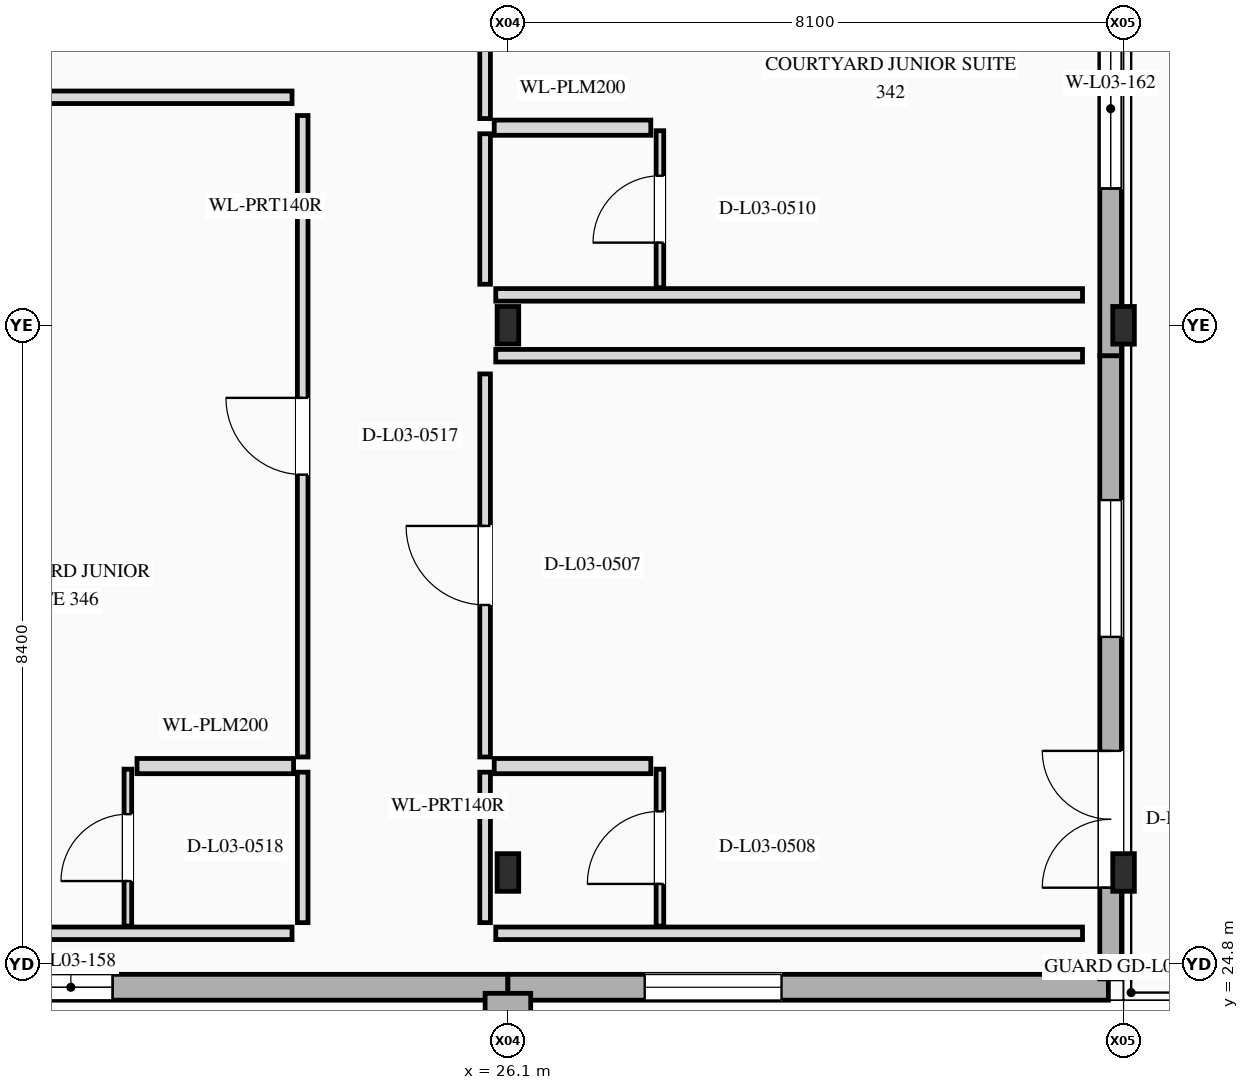
"""IFC4 building model, lengths in metres.
Left out: names, types, materials, properties, quantities, classifications, styles, units other than length and angle.
Written with IfcOpenShell. Run it as: python <this file> out.ifc"""

import sys

from ifc_helpers import new_model, si_unit, direction, frame, frame_2d, origin, origin_2d, place, context, subcontext, project, spatial, rectangle, i_section, extrude, element, fill, save


model = new_model("IFC4")
c1 = context("Model", 3, precision=1e-05, world=origin(), true_north=direction((0.0, 1.0)))
c2 = subcontext(c1, "Body", "Model", "MODEL_VIEW")
j1 = project(units=[si_unit("LENGTHUNIT", "METRE"), si_unit("PLANEANGLEUNIT", "RADIAN")], contexts=[c1])
p1 = place(None, origin())
s1 = spatial("IfcSite", under=j1, at=p1, CompositionType="ELEMENT")
p2 = place(p1, origin())
s2 = spatial("IfcBuilding", under=s1, at=p2, CompositionType="ELEMENT")
p3 = place(p2, frame((0.0, 0.0, 15.6)))
s3 = spatial("IfcBuildingStorey", under=s2, at=p3, CompositionType="ELEMENT", Elevation=15.6)
for number, where, z_axis, x_axis in (
    (1, (26.1, 26.0, -0.3), (0.0, 0.0, 1.0), (1.0, 0.0, 0.0)),
    (2, (34.2, 26.0, -0.3), (0.0, 0.0, 1.0), (1.0, 0.0, 0.0)),
    (3, (26.1, 33.2, -0.3), (0.0, 0.0, 1.0), (1.0, 0.0, 0.0)),
    (4, (34.2, 33.2, -0.3), (0.0, 0.0, 1.0), (1.0, 0.0, 0.0)),
):
    element("IfcColumn", number, at=place(p3, frame(where, z_axis=z_axis, x_axis=x_axis)), inside=s3, PredefinedType="COLUMN", context=c2, shape_type="SweptSolid", body=[
        extrude(i_section(OverallWidth=0.284, OverallDepth=0.495, WebThickness=0.019, FlangeThickness=0.033, at=origin_2d()), origin(), (0.0, 0.0, 1.0), 3.925),
    ])
p4 = place(p3, frame((18.0, 24.49, 0.0), z_axis=(0.0, 0.0, 1.0), x_axis=(1.0, 0.0, 0.0)))
e5 = element("IfcWall", 5, at=p4, inside=s3, PredefinedType="STANDARD", context=c2, shape_type="SweptSolid", body=[
    extrude(rectangle(XDim=8.1, YDim=0.34, at=frame_2d((4.05, 0.0))), origin(), (0.0, 0.0, 1.0), 3.9),
])
p5 = place(p4, frame((1.8, 0.0, 0.85)))
e6 = element("IfcOpeningElement", 6, at=p5, cuts=e5, PredefinedType="OPENING", context=c2, shape_type="SweptSolid", body=[
    extrude(rectangle(XDim=1.1, YDim=1.5, at=frame_2d((0.55, 0.75))), frame((0.0, 0.18, 0.0), z_axis=(0.0, -1.0, 0.0), x_axis=(1.0, 0.0, 0.0)), (0.0, 0.0, 1.0), 0.36),
])
p6 = place(p3, frame((26.1, 24.49, 0.0), z_axis=(0.0, 0.0, 1.0), x_axis=(1.0, 0.0, 0.0)))
e7 = element("IfcWall", 7, at=p6, inside=s3, PredefinedType="STANDARD", context=c2, shape_type="SweptSolid", body=[
    extrude(rectangle(XDim=7.9, YDim=0.34, at=frame_2d((3.95, 0.0))), origin(), (0.0, 0.0, 1.0), 3.9),
])
p7 = place(p6, frame((1.8, 0.0, 0.85)))
e8 = element("IfcOpeningElement", 8, at=p7, cuts=e7, PredefinedType="OPENING", context=c2, shape_type="SweptSolid", body=[
    extrude(rectangle(XDim=1.8, YDim=1.8, at=frame_2d((0.9, 0.9))), frame((0.0, 0.18, 0.0), z_axis=(0.0, -1.0, 0.0), x_axis=(1.0, 0.0, 0.0)), (0.0, 0.0, 1.0), 0.36),
])
p8 = place(p3, frame((25.8, 24.28, 0.0), z_axis=(0.0, 0.0, 1.0), x_axis=(1.0, 0.0, 0.0)))
e9 = element("IfcWall", 9, at=p8, inside=s3, PredefinedType="ELEMENTEDWALL", context=c2, shape_type="SweptSolid", body=[
    extrude(rectangle(XDim=0.6, YDim=0.26, at=frame_2d((0.3, 0.0))), origin(), (0.0, 0.0, 1.0), 3.9),
])
p9 = place(p3, frame((34.03, 24.6, 0.0), z_axis=(0.0, 0.0, 1.0), x_axis=(0.0, 1.0, 0.0)))
e10 = element("IfcWall", 10, at=p9, inside=s3, PredefinedType="STANDARD", context=c2, shape_type="SweptSolid", body=[
    extrude(rectangle(XDim=8.2, YDim=0.285, at=frame_2d((4.1, 0.0))), origin(), (0.0, 0.0, 1.0), 3.9),
])
p10 = place(p9, frame((1.2, 0.0, 0.0)))
e11 = element("IfcOpeningElement", 11, at=p10, cuts=e10, PredefinedType="OPENING", context=c2, shape_type="SweptSolid", body=[
    extrude(rectangle(XDim=1.8, YDim=2.3, at=frame_2d((0.9, 1.15))), frame((0.0, 0.152, 0.0), z_axis=(0.0, -1.0, 0.0), x_axis=(1.0, 0.0, 0.0)), (0.0, 0.0, 1.0), 0.305),
])
p11 = place(p9, frame((4.5, 0.0, 0.88)))
e12 = element("IfcOpeningElement", 12, at=p11, cuts=e10, PredefinedType="OPENING", context=c2, shape_type="SweptSolid", body=[
    extrude(rectangle(XDim=1.8, YDim=1.8, at=frame_2d((0.9, 0.9))), frame((0.0, 0.152, 0.0), z_axis=(0.0, -1.0, 0.0), x_axis=(1.0, 0.0, 0.0)), (0.0, 0.0, 1.0), 0.305),
])
p12 = place(p3, frame((34.03, 32.8, 0.0), z_axis=(0.0, 0.0, 1.0), x_axis=(0.0, 1.0, 0.0)))
e13 = element("IfcWall", 13, at=p12, inside=s3, PredefinedType="STANDARD", context=c2, shape_type="SweptSolid", body=[
    extrude(rectangle(XDim=8.8, YDim=0.285, at=frame_2d((4.4, 0.0))), origin(), (0.0, 0.0, 1.0), 3.9),
])
p13 = place(p12, frame((2.2, 0.0, 0.88)))
e14 = element("IfcOpeningElement", 14, at=p13, cuts=e13, PredefinedType="OPENING", context=c2, shape_type="SweptSolid", body=[
    extrude(rectangle(XDim=2.1, YDim=1.9, at=frame_2d((1.05, 0.95))), frame((0.0, 0.152, 0.0), z_axis=(0.0, -1.0, 0.0), x_axis=(1.0, 0.0, 0.0)), (0.0, 0.0, 1.0), 0.305),
])
p14 = place(p3, frame((25.8, 25.34, 0.0), z_axis=(0.0, 0.0, 1.0), x_axis=(0.0, 1.0, 0.0)))
e15 = element("IfcWall", 15, at=p14, inside=s3, PredefinedType="PARTITIONING", context=c2, shape_type="SweptSolid", body=[
    extrude(rectangle(XDim=1.98, YDim=0.14, at=frame_2d((0.99, 0.0))), origin(), (0.0, 0.0, 1.0), 2.584),
])
p15 = place(p3, frame((25.8, 27.52, 0.0), z_axis=(0.0, 0.0, 1.0), x_axis=(0.0, 1.0, 0.0)))
e16 = element("IfcWall", 16, at=p15, inside=s3, PredefinedType="PARTITIONING", context=c2, shape_type="SweptSolid", body=[
    extrude(rectangle(XDim=5.04, YDim=0.14, at=frame_2d((2.52, 0.0))), origin(), (0.0, 0.0, 1.0), 3.074),
])
p16 = place(p15, frame((2.0, 0.0, 0.0)))
e17 = element("IfcOpeningElement", 17, at=p16, cuts=e16, PredefinedType="OPENING", context=c2, shape_type="SweptSolid", body=[
    extrude(rectangle(XDim=1.04, YDim=2.4, at=frame_2d((0.52, 1.2))), frame((0.0, 0.08, 0.0), z_axis=(0.0, -1.0, 0.0), x_axis=(1.0, 0.0, 0.0)), (0.0, 0.0, 1.0), 0.16),
])
p17 = place(p3, frame((25.94, 25.2, 0.0), z_axis=(0.0, 0.0, 1.0), x_axis=(1.0, 0.0, 0.0)))
e18 = element("IfcWall", 18, at=p17, inside=s3, PredefinedType="PARTITIONING", context=c2, shape_type="SweptSolid", body=[
    extrude(rectangle(XDim=7.72, YDim=0.165, at=frame_2d((3.86, 0.0))), origin(), (0.0, 0.0, 1.0), 3.6),
])
p18 = place(p3, frame((25.94, 32.8, 0.0), z_axis=(0.0, 0.0, 1.0), x_axis=(1.0, 0.0, 0.0)))
e19 = element("IfcWall", 19, at=p18, inside=s3, PredefinedType="PARTITIONING", context=c2, shape_type="SweptSolid", body=[
    extrude(rectangle(XDim=7.72, YDim=0.165, at=frame_2d((3.86, 0.0))), origin(), (0.0, 0.0, 1.0), 3.074),
])
p19 = place(p3, frame((25.92, 27.4, 0.0), z_axis=(0.0, 0.0, 1.0), x_axis=(1.0, 0.0, 0.0)))
e20 = element("IfcWall", 20, at=p19, inside=s3, PredefinedType="PLUMBINGWALL", context=c2, shape_type="SweptSolid", body=[
    extrude(rectangle(XDim=2.06, YDim=0.2, at=frame_2d((1.03, 0.0))), origin(), (0.0, 0.0, 1.0), 3.074),
])
p20 = place(p3, frame((28.1, 25.294, 0.0), z_axis=(0.0, 0.0, 1.0), x_axis=(0.0, 1.0, 0.0)))
e21 = element("IfcWall", 21, at=p20, inside=s3, PredefinedType="PARTITIONING", context=c2, shape_type="SweptSolid", body=[
    extrude(rectangle(XDim=2.066, YDim=0.1, at=frame_2d((1.033, 0.0))), origin(), (0.0, 0.0, 1.0), 2.584),
])
p21 = place(p20, frame((0.555, 0.0, 0.0)))
e22 = element("IfcOpeningElement", 22, at=p21, cuts=e21, PredefinedType="OPENING", context=c2, shape_type="SweptSolid", body=[
    extrude(rectangle(XDim=0.955, YDim=2.14, at=frame_2d((0.478, 1.07))), frame((0.0, 0.06, 0.0), z_axis=(0.0, -1.0, 0.0), x_axis=(1.0, 0.0, 0.0)), (0.0, 0.0, 1.0), 0.12),
])
p22 = place(p3, frame((25.8, 33.74, 0.0), z_axis=(0.0, 0.0, 1.0), x_axis=(0.0, 1.0, 0.0)))
e23 = element("IfcWall", 23, at=p22, inside=s3, PredefinedType="PARTITIONING", context=c2, shape_type="SweptSolid", body=[
    extrude(rectangle(XDim=1.98, YDim=0.14, at=frame_2d((0.99, 0.0))), origin(), (0.0, 0.0, 1.0), 3.6),
])
p23 = place(p3, frame((25.8, 35.92, 0.0), z_axis=(0.0, 0.0, 1.0), x_axis=(0.0, 1.0, 0.0)))
e24 = element("IfcWall", 24, at=p23, inside=s3, PredefinedType="PARTITIONING", context=c2, shape_type="SweptSolid", body=[
    extrude(rectangle(XDim=4.84, YDim=0.14, at=frame_2d((2.42, 0.0))), origin(), (0.0, 0.0, 1.0), 3.074),
])
p24 = place(p23, frame((1.885, 0.0, 0.0)))
e25 = element("IfcOpeningElement", 25, at=p24, cuts=e24, PredefinedType="OPENING", context=c2, shape_type="SweptSolid", body=[
    extrude(rectangle(XDim=1.07, YDim=2.4, at=frame_2d((0.535, 1.2))), frame((0.0, 0.08, 0.0), z_axis=(0.0, -1.0, 0.0), x_axis=(1.0, 0.0, 0.0)), (0.0, 0.0, 1.0), 0.16),
])
p25 = place(p3, frame((25.94, 33.6, 0.0), z_axis=(0.0, 0.0, 1.0), x_axis=(1.0, 0.0, 0.0)))
e26 = element("IfcWall", 26, at=p25, inside=s3, PredefinedType="PARTITIONING", context=c2, shape_type="SweptSolid", body=[
    extrude(rectangle(XDim=7.72, YDim=0.165, at=frame_2d((3.86, 0.0))), origin(), (0.0, 0.0, 1.0), 3.074),
])
p26 = place(p3, frame((25.92, 35.8, 0.0), z_axis=(0.0, 0.0, 1.0), x_axis=(1.0, 0.0, 0.0)))
e27 = element("IfcWall", 27, at=p26, inside=s3, PredefinedType="PLUMBINGWALL", context=c2, shape_type="SweptSolid", body=[
    extrude(rectangle(XDim=2.06, YDim=0.2, at=frame_2d((1.03, 0.0))), origin(), (0.0, 0.0, 1.0), 3.074),
])
p27 = place(p3, frame((28.1, 33.695, 0.0), z_axis=(0.0, 0.0, 1.0), x_axis=(0.0, 1.0, 0.0)))
e28 = element("IfcWall", 28, at=p27, inside=s3, PredefinedType="PARTITIONING", context=c2, shape_type="SweptSolid", body=[
    extrude(rectangle(XDim=2.065, YDim=0.1, at=frame_2d((1.033, 0.0))), origin(), (0.0, 0.0, 1.0), 3.6),
])
p28 = place(p27, frame((0.593, 0.0, 0.0)))
e29 = element("IfcOpeningElement", 29, at=p28, cuts=e28, PredefinedType="OPENING", context=c2, shape_type="SweptSolid", body=[
    extrude(rectangle(XDim=0.88, YDim=2.18, at=frame_2d((0.44, 1.09))), frame((0.0, 0.06, 0.0), z_axis=(0.0, -1.0, 0.0), x_axis=(1.0, 0.0, 0.0)), (0.0, 0.0, 1.0), 0.12),
])
p29 = place(p3, frame((23.4, 25.34, 0.0), z_axis=(0.0, 0.0, 1.0), x_axis=(0.0, 1.0, 0.0)))
e30 = element("IfcWall", 30, at=p29, inside=s3, PredefinedType="PARTITIONING", context=c2, shape_type="SweptSolid", body=[
    extrude(rectangle(XDim=1.98, YDim=0.14, at=frame_2d((0.99, 0.0))), origin(), (0.0, 0.0, 1.0), 2.584),
])
p30 = place(p3, frame((23.4, 27.52, 0.0), z_axis=(0.0, 0.0, 1.0), x_axis=(0.0, 1.0, 0.0)))
e31 = element("IfcWall", 31, at=p30, inside=s3, PredefinedType="PARTITIONING", context=c2, shape_type="SweptSolid", body=[
    extrude(rectangle(XDim=8.44, YDim=0.14, at=frame_2d((4.22, 0.0))), origin(), (0.0, 0.0, 1.0), 2.584),
])
p31 = place(p30, frame((3.715, 0.0, 0.0)))
e32 = element("IfcOpeningElement", 32, at=p31, cuts=e31, PredefinedType="OPENING", context=c2, shape_type="SweptSolid", body=[
    extrude(rectangle(XDim=1.01, YDim=2.2, at=frame_2d((0.505, 1.1))), frame((0.0, 0.08, 0.0), z_axis=(0.0, -1.0, 0.0), x_axis=(1.0, 0.0, 0.0)), (0.0, 0.0, 1.0), 0.16),
])
p32 = place(p3, frame((17.74, 25.2, 0.0), z_axis=(0.0, 0.0, 1.0), x_axis=(1.0, 0.0, 0.0)))
e33 = element("IfcWall", 33, at=p32, inside=s3, PredefinedType="PARTITIONING", context=c2, shape_type="SweptSolid", body=[
    extrude(rectangle(XDim=5.52, YDim=0.165, at=frame_2d((2.76, 0.0))), origin(), (0.0, 0.0, 1.0), 3.6),
])
p33 = place(p3, frame((17.74, 36.2, 0.0), z_axis=(0.0, 0.0, 1.0), x_axis=(1.0, 0.0, 0.0)))
e34 = element("IfcWall", 34, at=p33, inside=s3, PredefinedType="PARTITIONING", context=c2, shape_type="SweptSolid", body=[
    extrude(rectangle(XDim=5.52, YDim=0.165, at=frame_2d((2.76, 0.0))), origin(), (0.0, 0.0, 1.0), 3.074),
])
p34 = place(p3, frame((21.22, 27.4, 0.0), z_axis=(0.0, 0.0, 1.0), x_axis=(1.0, 0.0, 0.0)))
e35 = element("IfcWall", 35, at=p34, inside=s3, PredefinedType="PLUMBINGWALL", context=c2, shape_type="SweptSolid", body=[
    extrude(rectangle(XDim=2.06, YDim=0.2, at=frame_2d((1.03, 0.0))), origin(), (0.0, 0.0, 1.0), 3.6),
])
p35 = place(p3, frame((21.1, 25.294, 0.0), z_axis=(0.0, 0.0, 1.0), x_axis=(0.0, 1.0, 0.0)))
e36 = element("IfcWall", 36, at=p35, inside=s3, PredefinedType="PARTITIONING", context=c2, shape_type="SweptSolid", body=[
    extrude(rectangle(XDim=2.066, YDim=0.1, at=frame_2d((1.033, 0.0))), origin(), (0.0, 0.0, 1.0), 2.584),
])
p36 = place(p35, frame((0.593, 0.0, 0.0)))
e37 = element("IfcOpeningElement", 37, at=p36, cuts=e36, PredefinedType="OPENING", context=c2, shape_type="SweptSolid", body=[
    extrude(rectangle(XDim=0.88, YDim=2.1, at=frame_2d((0.44, 1.05))), frame((0.0, 0.06, 0.0), z_axis=(0.0, -1.0, 0.0), x_axis=(1.0, 0.0, 0.0)), (0.0, 0.0, 1.0), 0.12),
])
p37 = place(p5, origin())
e38 = element("IfcWindow", 38, at=p37, inside=s3, PartitioningType="SINGLE_PANEL", PredefinedType="WINDOW", context=c2, shape_type="SweptSolid", body=[
    extrude(rectangle(XDim=1.1, YDim=1.5, at=frame_2d((0.55, 0.75))), frame((0.0, 0.03, 0.0), z_axis=(0.0, -1.0, 0.0), x_axis=(1.0, 0.0, 0.0)), (0.0, 0.0, 1.0), 0.06),
])
fill(e6, e38)
p38 = place(p7, origin())
e39 = element("IfcWindow", 39, at=p38, inside=s3, PartitioningType="SINGLE_PANEL", PredefinedType="WINDOW", context=c2, shape_type="SweptSolid", body=[
    extrude(rectangle(XDim=1.8, YDim=1.8, at=frame_2d((0.9, 0.9))), frame((0.0, 0.03, 0.0), z_axis=(0.0, -1.0, 0.0), x_axis=(1.0, 0.0, 0.0)), (0.0, 0.0, 1.0), 0.06),
])
fill(e8, e39)
p39 = place(p10, origin())
e40 = element("IfcDoor", 40, at=p39, inside=s3, OperationType="DOUBLE_DOOR_SINGLE_SWING", PredefinedType="DOOR", context=c2, shape_type="SweptSolid", body=[
    extrude(rectangle(XDim=1.8, YDim=2.3, at=frame_2d((0.9, 1.15))), frame((0.0, 0.025, 0.0), z_axis=(0.0, -1.0, 0.0), x_axis=(1.0, 0.0, 0.0)), (0.0, 0.0, 1.0), 0.05),
])
fill(e11, e40)
p40 = place(p11, origin())
e41 = element("IfcWindow", 41, at=p40, inside=s3, PartitioningType="SINGLE_PANEL", PredefinedType="WINDOW", context=c2, shape_type="SweptSolid", body=[
    extrude(rectangle(XDim=1.8, YDim=1.8, at=frame_2d((0.9, 0.9))), frame((0.0, 0.03, 0.0), z_axis=(0.0, -1.0, 0.0), x_axis=(1.0, 0.0, 0.0)), (0.0, 0.0, 1.0), 0.06),
])
fill(e12, e41)
p41 = place(p13, origin())
e42 = element("IfcWindow", 42, at=p41, inside=s3, PartitioningType="SINGLE_PANEL", PredefinedType="WINDOW", context=c2, shape_type="SweptSolid", body=[
    extrude(rectangle(XDim=2.1, YDim=1.9, at=frame_2d((1.05, 0.95))), frame((0.0, 0.03, 0.0), z_axis=(0.0, -1.0, 0.0), x_axis=(1.0, 0.0, 0.0)), (0.0, 0.0, 1.0), 0.06),
])
fill(e14, e42)
p42 = place(p16, origin())
e43 = element("IfcDoor", 43, at=p42, inside=s3, OperationType="SINGLE_SWING_RIGHT", PredefinedType="DOOR", context=c2, shape_type="SweptSolid", body=[
    extrude(rectangle(XDim=1.04, YDim=2.4, at=frame_2d((0.52, 1.2))), frame((0.0, 0.025, 0.0), z_axis=(0.0, -1.0, 0.0), x_axis=(1.0, 0.0, 0.0)), (0.0, 0.0, 1.0), 0.05),
])
fill(e17, e43)
p43 = place(p21, origin())
e44 = element("IfcDoor", 44, at=p43, inside=s3, OperationType="SINGLE_SWING_LEFT", PredefinedType="DOOR", context=c2, shape_type="SweptSolid", body=[
    extrude(rectangle(XDim=0.955, YDim=2.14, at=frame_2d((0.478, 1.07))), frame((0.0, 0.025, 0.0), z_axis=(0.0, -1.0, 0.0), x_axis=(1.0, 0.0, 0.0)), (0.0, 0.0, 1.0), 0.05),
])
fill(e22, e44)
p44 = place(p28, origin())
e45 = element("IfcDoor", 45, at=p44, inside=s3, OperationType="SINGLE_SWING_LEFT", PredefinedType="DOOR", context=c2, shape_type="SweptSolid", body=[
    extrude(rectangle(XDim=0.88, YDim=2.18, at=frame_2d((0.44, 1.09))), frame((0.0, 0.025, 0.0), z_axis=(0.0, -1.0, 0.0), x_axis=(1.0, 0.0, 0.0)), (0.0, 0.0, 1.0), 0.05),
])
fill(e29, e45)
p45 = place(p31, origin())
e46 = element("IfcDoor", 46, at=p45, inside=s3, OperationType="SINGLE_SWING_RIGHT", PredefinedType="DOOR", context=c2, shape_type="SweptSolid", body=[
    extrude(rectangle(XDim=1.01, YDim=2.2, at=frame_2d((0.505, 1.1))), frame((0.0, 0.025, 0.0), z_axis=(0.0, -1.0, 0.0), x_axis=(1.0, 0.0, 0.0)), (0.0, 0.0, 1.0), 0.05),
])
fill(e32, e46)
p46 = place(p36, origin())
e47 = element("IfcDoor", 47, at=p46, inside=s3, OperationType="SINGLE_SWING_LEFT", PredefinedType="DOOR", context=c2, shape_type="SweptSolid", body=[
    extrude(rectangle(XDim=0.88, YDim=2.1, at=frame_2d((0.44, 1.05))), frame((0.0, 0.025, 0.0), z_axis=(0.0, -1.0, 0.0), x_axis=(1.0, 0.0, 0.0)), (0.0, 0.0, 1.0), 0.05),
])
fill(e37, e47)
save(model, sys.argv[1])
